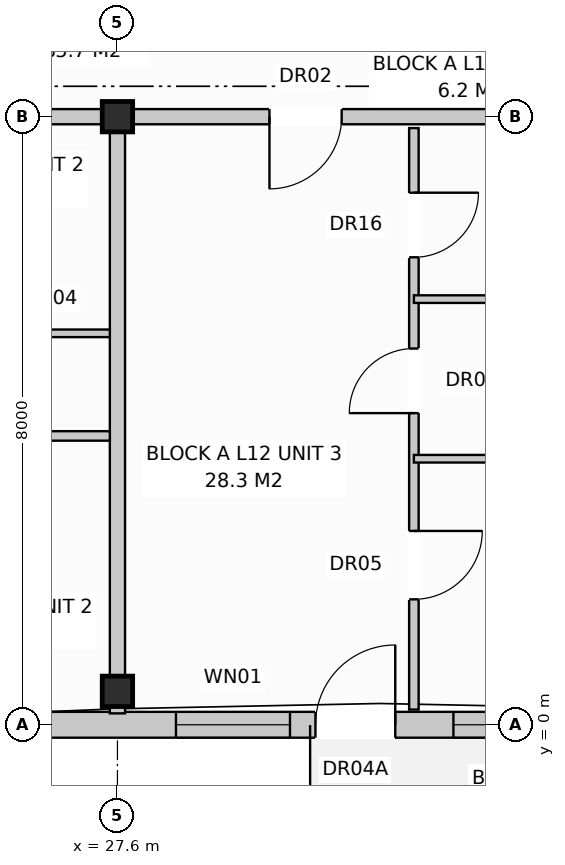
"""IFC4 building model, lengths in metres.
Left out: names, types, materials, properties, quantities, classifications, styles, units other than length and angle.
Written with IfcOpenShell. Run it as: python <this file> out.ifc"""

import sys

from ifc_helpers import new_model, si_unit, direction, frame, frame_2d, origin, origin_with_axes, origin_2d, place, context, subcontext, project, spatial, rectangle, extrude, element, fill, save


model = new_model("IFC4")
c1 = context("Model", 3, precision=1e-05, world=origin(), true_north=direction((0.0, 1.0)))
c2 = subcontext(c1, "Body", "Model", "MODEL_VIEW")
j1 = project(units=[si_unit("LENGTHUNIT", "METRE"), si_unit("PLANEANGLEUNIT", "RADIAN")], contexts=[c1])
p1 = place(None, origin())
s1 = spatial("IfcSite", under=j1, at=p1, CompositionType="ELEMENT")
p2 = place(p1, origin())
s2 = spatial("IfcBuilding", under=s1, at=p2, CompositionType="ELEMENT")
p3 = place(p2, frame((0.0, 0.0, 40.0)))
s3 = spatial("IfcBuildingStorey", under=s2, at=p3, CompositionType="ELEMENT", Elevation=40.0)
for number, where, z_axis, x_axis in (
    (1, (27.6, 0.44, 0.0), (0.0, 0.0, 1.0), (1.0, 0.0, 0.0)),
    (2, (27.6, 8.0, 0.0), (0.0, 0.0, 1.0), (1.0, 0.0, 0.0)),
):
    element("IfcColumn", number, at=place(p3, frame(where, z_axis=z_axis, x_axis=x_axis)), inside=s3, PredefinedType="COLUMN", context=c2, shape_type="SweptSolid", body=[
        extrude(rectangle(XDim=0.4, YDim=0.4, at=origin_2d()), origin(), (0.0, 0.0, 1.0), 3.2),
    ])
p4 = place(p3, frame((0.16, 0.0, 0.0), z_axis=(0.0, 0.0, 1.0), x_axis=(1.0, 0.0, 0.0)))
e3 = element("IfcWall", 3, at=p4, inside=s3, PredefinedType="STANDARD", context=c2, shape_type="SweptSolid", body=[
    extrude(rectangle(XDim=41.08, YDim=0.34, at=frame_2d((20.54, 0.0))), origin(), (0.0, 0.0, 1.0), 2.97),
])
p5 = place(p4, frame((2.745, 0.0, 0.0)))
e4 = element("IfcOpeningElement", 4, at=p5, cuts=e3, PredefinedType="OPENING", context=c2, shape_type="SweptSolid", body=[
    extrude(rectangle(XDim=1.05, YDim=2.12, at=frame_2d((0.525, 1.06))), frame((0.0, 0.182, 0.0), z_axis=(0.0, -1.0, 0.0), x_axis=(1.0, 0.0, 0.0)), (0.0, 0.0, 1.0), 0.364),
])
p6 = place(p4, frame((17.545, 0.0, 0.0)))
e5 = element("IfcOpeningElement", 5, at=p6, cuts=e3, PredefinedType="OPENING", context=c2, shape_type="SweptSolid", body=[
    extrude(rectangle(XDim=1.05, YDim=2.12, at=frame_2d((0.525, 1.06))), frame((0.0, 0.182, 0.0), z_axis=(0.0, -1.0, 0.0), x_axis=(1.0, 0.0, 0.0)), (0.0, 0.0, 1.0), 0.364),
])
p7 = place(p4, frame((30.045, 0.0, 0.0)))
e6 = element("IfcOpeningElement", 6, at=p7, cuts=e3, PredefinedType="OPENING", context=c2, shape_type="SweptSolid", body=[
    extrude(rectangle(XDim=1.05, YDim=2.12, at=frame_2d((0.525, 1.06))), frame((0.0, 0.182, 0.0), z_axis=(0.0, -1.0, 0.0), x_axis=(1.0, 0.0, 0.0)), (0.0, 0.0, 1.0), 0.364),
])
p8 = place(p4, frame((0.61, 0.0, 0.8)))
e7 = element("IfcOpeningElement", 7, at=p8, cuts=e3, PredefinedType="OPENING", context=c2, shape_type="SweptSolid", body=[
    extrude(rectangle(XDim=1.8, YDim=1.7, at=frame_2d((0.9, 0.85))), frame((0.0, 0.182, 0.0), z_axis=(0.0, -1.0, 0.0), x_axis=(1.0, 0.0, 0.0)), (0.0, 0.0, 1.0), 0.364),
])
p9 = place(p4, frame((4.36, 0.0, 0.72)))
e8 = element("IfcOpeningElement", 8, at=p9, cuts=e3, PredefinedType="OPENING", context=c2, shape_type="SweptSolid", body=[
    extrude(rectangle(XDim=1.9, YDim=1.85, at=frame_2d((0.95, 0.925))), frame((0.0, 0.182, 0.0), z_axis=(0.0, -1.0, 0.0), x_axis=(1.0, 0.0, 0.0)), (0.0, 0.0, 1.0), 0.364),
])
p10 = place(p4, frame((10.46, 0.0, 0.72)))
e9 = element("IfcOpeningElement", 9, at=p10, cuts=e3, PredefinedType="OPENING", context=c2, shape_type="SweptSolid", body=[
    extrude(rectangle(XDim=1.1, YDim=1.5, at=frame_2d((0.55, 0.75))), frame((0.0, 0.182, 0.0), z_axis=(0.0, -1.0, 0.0), x_axis=(1.0, 0.0, 0.0)), (0.0, 0.0, 1.0), 0.364),
])
p11 = place(p4, frame((15.76, 0.0, 0.72)))
e10 = element("IfcOpeningElement", 10, at=p11, cuts=e3, PredefinedType="OPENING", context=c2, shape_type="SweptSolid", body=[
    extrude(rectangle(XDim=1.1, YDim=1.5, at=frame_2d((0.55, 0.75))), frame((0.0, 0.182, 0.0), z_axis=(0.0, -1.0, 0.0), x_axis=(1.0, 0.0, 0.0)), (0.0, 0.0, 1.0), 0.364),
])
p12 = place(p4, frame((21.042, 0.0, 0.72)))
e11 = element("IfcOpeningElement", 11, at=p12, cuts=e3, PredefinedType="OPENING", context=c2, shape_type="SweptSolid", body=[
    extrude(rectangle(XDim=1.9, YDim=1.85, at=frame_2d((0.95, 0.925))), frame((0.0, 0.182, 0.0), z_axis=(0.0, -1.0, 0.0), x_axis=(1.0, 0.0, 0.0)), (0.0, 0.0, 1.0), 0.364),
])
p13 = place(p4, frame((24.66, 0.0, 0.72)))
e12 = element("IfcOpeningElement", 12, at=p13, cuts=e3, PredefinedType="OPENING", context=c2, shape_type="SweptSolid", body=[
    extrude(rectangle(XDim=1.1, YDim=1.5, at=frame_2d((0.55, 0.75))), frame((0.0, 0.182, 0.0), z_axis=(0.0, -1.0, 0.0), x_axis=(1.0, 0.0, 0.0)), (0.0, 0.0, 1.0), 0.364),
])
p14 = place(p4, frame((28.21, 0.0, 0.85)))
e13 = element("IfcOpeningElement", 13, at=p14, cuts=e3, PredefinedType="OPENING", context=c2, shape_type="SweptSolid", body=[
    extrude(rectangle(XDim=1.5, YDim=1.65, at=frame_2d((0.75, 0.825))), frame((0.0, 0.182, 0.0), z_axis=(0.0, -1.0, 0.0), x_axis=(1.0, 0.0, 0.0)), (0.0, 0.0, 1.0), 0.364),
])
p15 = place(p4, frame((31.86, 0.0, 0.72)))
e14 = element("IfcOpeningElement", 14, at=p15, cuts=e3, PredefinedType="OPENING", context=c2, shape_type="SweptSolid", body=[
    extrude(rectangle(XDim=1.9, YDim=1.85, at=frame_2d((0.95, 0.925))), frame((0.0, 0.182, 0.0), z_axis=(0.0, -1.0, 0.0), x_axis=(1.0, 0.0, 0.0)), (0.0, 0.0, 1.0), 0.364),
])
p16 = place(p4, frame((35.335, 0.0, 0.8)))
e15 = element("IfcOpeningElement", 15, at=p16, cuts=e3, PredefinedType="OPENING", context=c2, shape_type="SweptSolid", body=[
    extrude(rectangle(XDim=1.95, YDim=1.65, at=frame_2d((0.975, 0.825))), frame((0.0, 0.182, 0.0), z_axis=(0.0, -1.0, 0.0), x_axis=(1.0, 0.0, 0.0)), (0.0, 0.0, 1.0), 0.364),
])
p17 = place(p4, frame((38.675, 0.0, 0.8)))
e16 = element("IfcOpeningElement", 16, at=p17, cuts=e3, PredefinedType="OPENING", context=c2, shape_type="SweptSolid", body=[
    extrude(rectangle(XDim=1.8, YDim=1.7, at=frame_2d((0.9, 0.85))), frame((0.0, 0.182, 0.0), z_axis=(0.0, -1.0, 0.0), x_axis=(1.0, 0.0, 0.0)), (0.0, 0.0, 1.0), 0.364),
])
p18 = place(p3, frame((27.6, 7.85, 0.0), z_axis=(0.0, 0.0, 1.0), x_axis=(0.0, -1.0, 0.0)))
e17 = element("IfcWall", 17, at=p18, inside=s3, PredefinedType="PARTITIONING", context=c2, shape_type="SweptSolid", body=[
    extrude(rectangle(XDim=7.7, YDim=0.2, at=frame_2d((3.85, 0.0))), origin(), (0.0, 0.0, 1.0), 2.97),
])
p19 = place(p3, frame((13.8, 8.0, 0.0), z_axis=(0.0, 0.0, 1.0), x_axis=(1.0, 0.0, 0.0)))
e18 = element("IfcWall", 18, at=p19, inside=s3, PredefinedType="PARTITIONING", context=c2, shape_type="SweptSolid", body=[
    extrude(rectangle(XDim=13.8, YDim=0.2, at=frame_2d((6.9, 0.0))), origin(), (0.0, 0.0, 1.0), 2.41),
])
p20 = place(p19, frame((2.4, 0.0, 0.0)))
e19 = element("IfcOpeningElement", 19, at=p20, cuts=e18, PredefinedType="OPENING", context=c2, shape_type="SweptSolid", body=[
    extrude(rectangle(XDim=0.95, YDim=2.15, at=frame_2d((0.475, 1.075))), frame((0.0, 0.112, 0.0), z_axis=(0.0, -1.0, 0.0), x_axis=(1.0, 0.0, 0.0)), (0.0, 0.0, 1.0), 0.224),
])
p21 = place(p3, frame((19.0, 5.15, 0.0), z_axis=(0.0, 0.0, 1.0), x_axis=(1.0, 0.0, 0.0)))
e20 = element("IfcWall", 20, at=p21, inside=s3, PredefinedType="PARTITIONING", context=c2, shape_type="SweptSolid", body=[
    extrude(rectangle(XDim=8.5, YDim=0.1, at=frame_2d((4.25, 0.0))), origin(), (0.0, 0.0, 1.0), 2.97),
])
p22 = place(p21, frame((1.0, 0.0, 0.0)))
e21 = element("IfcOpeningElement", 21, at=p22, cuts=e20, PredefinedType="OPENING", context=c2, shape_type="SweptSolid", body=[
    extrude(rectangle(XDim=0.85, YDim=2.1, at=frame_2d((0.425, 1.05))), frame((0.0, 0.062, 0.0), z_axis=(0.0, -1.0, 0.0), x_axis=(1.0, 0.0, 0.0)), (0.0, 0.0, 1.0), 0.124),
])
p23 = place(p21, frame((3.4, 0.0, 0.0)))
e22 = element("IfcOpeningElement", 22, at=p23, cuts=e20, PredefinedType="OPENING", context=c2, shape_type="SweptSolid", body=[
    extrude(rectangle(XDim=0.85, YDim=2.05, at=frame_2d((0.425, 1.025))), frame((0.0, 0.062, 0.0), z_axis=(0.0, -1.0, 0.0), x_axis=(1.0, 0.0, 0.0)), (0.0, 0.0, 1.0), 0.124),
])
p24 = place(p21, frame((6.2, 0.0, 0.0)))
e23 = element("IfcOpeningElement", 23, at=p24, cuts=e20, PredefinedType="OPENING", context=c2, shape_type="SweptSolid", body=[
    extrude(rectangle(XDim=0.85, YDim=2.05, at=frame_2d((0.425, 1.025))), frame((0.0, 0.062, 0.0), z_axis=(0.0, -1.0, 0.0), x_axis=(1.0, 0.0, 0.0)), (0.0, 0.0, 1.0), 0.124),
])
p25 = place(p3, frame((19.0, 3.8, 0.0), z_axis=(0.0, 0.0, 1.0), x_axis=(1.0, 0.0, 0.0)))
e24 = element("IfcWall", 24, at=p25, inside=s3, PredefinedType="PARTITIONING", context=c2, shape_type="SweptSolid", body=[
    extrude(rectangle(XDim=8.5, YDim=0.125, at=frame_2d((4.25, 0.0))), origin(), (0.0, 0.0, 1.0), 2.97),
])
p26 = place(p25, frame((1.5, 0.0, 0.0)))
e25 = element("IfcOpeningElement", 25, at=p26, cuts=e24, PredefinedType="OPENING", context=c2, shape_type="SweptSolid", body=[
    extrude(rectangle(XDim=0.9, YDim=2.1, at=frame_2d((0.45, 1.05))), frame((0.0, 0.074, 0.0), z_axis=(0.0, -1.0, 0.0), x_axis=(1.0, 0.0, 0.0)), (0.0, 0.0, 1.0), 0.149),
])
p27 = place(p25, frame((5.6, 0.0, 0.0)))
e26 = element("IfcOpeningElement", 26, at=p27, cuts=e24, PredefinedType="OPENING", context=c2, shape_type="SweptSolid", body=[
    extrude(rectangle(XDim=0.9, YDim=2.1, at=frame_2d((0.45, 1.05))), frame((0.0, 0.074, 0.0), z_axis=(0.0, -1.0, 0.0), x_axis=(1.0, 0.0, 0.0)), (0.0, 0.0, 1.0), 0.149),
])
p28 = place(p3, frame((27.6, 8.0, 0.0), z_axis=(0.0, 0.0, 1.0), x_axis=(1.0, 0.0, 0.0)))
e27 = element("IfcWall", 27, at=p28, inside=s3, PredefinedType="PARTITIONING", context=c2, shape_type="SweptSolid", body=[
    extrude(rectangle(XDim=6.9, YDim=0.2, at=frame_2d((3.45, 0.0))), origin(), (0.0, 0.0, 1.0), 2.41),
])
p29 = place(p28, frame((2.0, 0.0, 0.0)))
e28 = element("IfcOpeningElement", 28, at=p29, cuts=e27, PredefinedType="OPENING", context=c2, shape_type="SweptSolid", body=[
    extrude(rectangle(XDim=0.95, YDim=2.15, at=frame_2d((0.475, 1.075))), frame((0.0, 0.112, 0.0), z_axis=(0.0, -1.0, 0.0), x_axis=(1.0, 0.0, 0.0)), (0.0, 0.0, 1.0), 0.224),
])
p30 = place(p3, frame((31.5, 7.85, 0.0), z_axis=(0.0, 0.0, 1.0), x_axis=(0.0, -1.0, 0.0)))
e29 = element("IfcWall", 29, at=p30, inside=s3, PredefinedType="PARTITIONING", context=c2, shape_type="SweptSolid", body=[
    extrude(rectangle(XDim=7.65, YDim=0.125, at=frame_2d((3.825, 0.0))), origin(), (0.0, 0.0, 1.0), 2.97),
])
p31 = place(p30, frame((0.85, 0.0, 0.0)))
e30 = element("IfcOpeningElement", 30, at=p31, cuts=e29, PredefinedType="OPENING", context=c2, shape_type="SweptSolid", body=[
    extrude(rectangle(XDim=0.85, YDim=2.1, at=frame_2d((0.425, 1.05))), frame((0.0, 0.074, 0.0), z_axis=(0.0, -1.0, 0.0), x_axis=(1.0, 0.0, 0.0)), (0.0, 0.0, 1.0), 0.149),
])
p32 = place(p30, frame((2.9, 0.0, 0.0)))
e31 = element("IfcOpeningElement", 31, at=p32, cuts=e29, PredefinedType="OPENING", context=c2, shape_type="SweptSolid", body=[
    extrude(rectangle(XDim=0.85, YDim=2.05, at=frame_2d((0.425, 1.025))), frame((0.0, 0.074, 0.0), z_axis=(0.0, -1.0, 0.0), x_axis=(1.0, 0.0, 0.0)), (0.0, 0.0, 1.0), 0.149),
])
p33 = place(p30, frame((5.3, 0.0, 0.0)))
e32 = element("IfcOpeningElement", 32, at=p33, cuts=e29, PredefinedType="OPENING", context=c2, shape_type="SweptSolid", body=[
    extrude(rectangle(XDim=0.9, YDim=2.1, at=frame_2d((0.45, 1.05))), frame((0.0, 0.074, 0.0), z_axis=(0.0, -1.0, 0.0), x_axis=(1.0, 0.0, 0.0)), (0.0, 0.0, 1.0), 0.149),
])
for number, where, z_axis, x_axis in (
    (33, (31.5, 5.6, 0.0), (0.0, 0.0, 1.0), (1.0, 0.0, 0.0)),
    (34, (31.5, 3.5, 0.0), (0.0, 0.0, 1.0), (1.0, 0.0, 0.0)),
):
    element("IfcWall", number, at=place(p3, frame(where, z_axis=z_axis, x_axis=x_axis)), inside=s3, PredefinedType="PARTITIONING", context=c2, shape_type="SweptSolid", body=[
        extrude(rectangle(XDim=2.9, YDim=0.1, at=frame_2d((1.45, 0.0))), origin(), (0.0, 0.0, 1.0), 2.97),
    ])
p34 = place(p7, origin_with_axes())
e35 = element("IfcDoor", 35, at=p34, inside=s3, OperationType="SINGLE_SWING_RIGHT", PredefinedType="DOOR", context=c2, shape_type="SweptSolid", body=[
    extrude(rectangle(XDim=1.05, YDim=2.12, at=frame_2d((0.525, 1.06))), frame((0.0, 0.025, 0.0), z_axis=(0.0, -1.0, 0.0), x_axis=(1.0, 0.0, 0.0)), (0.0, 0.0, 1.0), 0.05),
])
fill(e6, e35)
p35 = place(p14, origin_with_axes())
e36 = element("IfcWindow", 36, at=p35, inside=s3, PartitioningType="SINGLE_PANEL", PredefinedType="WINDOW", context=c2, shape_type="SweptSolid", body=[
    extrude(rectangle(XDim=1.5, YDim=1.65, at=frame_2d((0.75, 0.825))), frame((0.0, 0.03, 0.0), z_axis=(0.0, -1.0, 0.0), x_axis=(1.0, 0.0, 0.0)), (0.0, 0.0, 1.0), 0.06),
])
fill(e13, e36)
p36 = place(p15, origin_with_axes())
e37 = element("IfcWindow", 37, at=p36, inside=s3, PartitioningType="SINGLE_PANEL", PredefinedType="WINDOW", context=c2, shape_type="SweptSolid", body=[
    extrude(rectangle(XDim=1.9, YDim=1.85, at=frame_2d((0.95, 0.925))), frame((0.0, 0.03, 0.0), z_axis=(0.0, -1.0, 0.0), x_axis=(1.0, 0.0, 0.0)), (0.0, 0.0, 1.0), 0.06),
])
fill(e14, e37)
p37 = place(p29, frame((0.95, 0.0, 0.0), z_axis=(0.0, 0.0, 1.0), x_axis=(-1.0, 0.0, 0.0)))
e38 = element("IfcDoor", 38, at=p37, inside=s3, OperationType="SINGLE_SWING_LEFT", PredefinedType="DOOR", context=c2, shape_type="SweptSolid", body=[
    extrude(rectangle(XDim=0.95, YDim=2.15, at=frame_2d((0.475, 1.075))), frame((0.0, 0.025, 0.0), z_axis=(0.0, -1.0, 0.0), x_axis=(1.0, 0.0, 0.0)), (0.0, 0.0, 1.0), 0.05),
])
fill(e28, e38)
p38 = place(p31, origin_with_axes())
e39 = element("IfcDoor", 39, at=p38, inside=s3, OperationType="SINGLE_SWING_LEFT", PredefinedType="DOOR", context=c2, shape_type="SweptSolid", body=[
    extrude(rectangle(XDim=0.85, YDim=2.1, at=frame_2d((0.425, 1.05))), frame((0.0, 0.025, 0.0), z_axis=(0.0, -1.0, 0.0), x_axis=(1.0, 0.0, 0.0)), (0.0, 0.0, 1.0), 0.05),
])
fill(e30, e39)
p39 = place(p32, frame((0.85, 0.0, 0.0), z_axis=(0.0, 0.0, 1.0), x_axis=(-1.0, 0.0, 0.0)))
e40 = element("IfcDoor", 40, at=p39, inside=s3, OperationType="SINGLE_SWING_RIGHT", PredefinedType="DOOR", context=c2, shape_type="SweptSolid", body=[
    extrude(rectangle(XDim=0.85, YDim=2.05, at=frame_2d((0.425, 1.025))), frame((0.0, 0.025, 0.0), z_axis=(0.0, -1.0, 0.0), x_axis=(1.0, 0.0, 0.0)), (0.0, 0.0, 1.0), 0.05),
])
fill(e31, e40)
p40 = place(p33, origin_with_axes())
e41 = element("IfcDoor", 41, at=p40, inside=s3, OperationType="SINGLE_SWING_LEFT", PredefinedType="DOOR", context=c2, shape_type="SweptSolid", body=[
    extrude(rectangle(XDim=0.9, YDim=2.1, at=frame_2d((0.45, 1.05))), frame((0.0, 0.025, 0.0), z_axis=(0.0, -1.0, 0.0), x_axis=(1.0, 0.0, 0.0)), (0.0, 0.0, 1.0), 0.05),
])
fill(e32, e41)
save(model, sys.argv[1])
